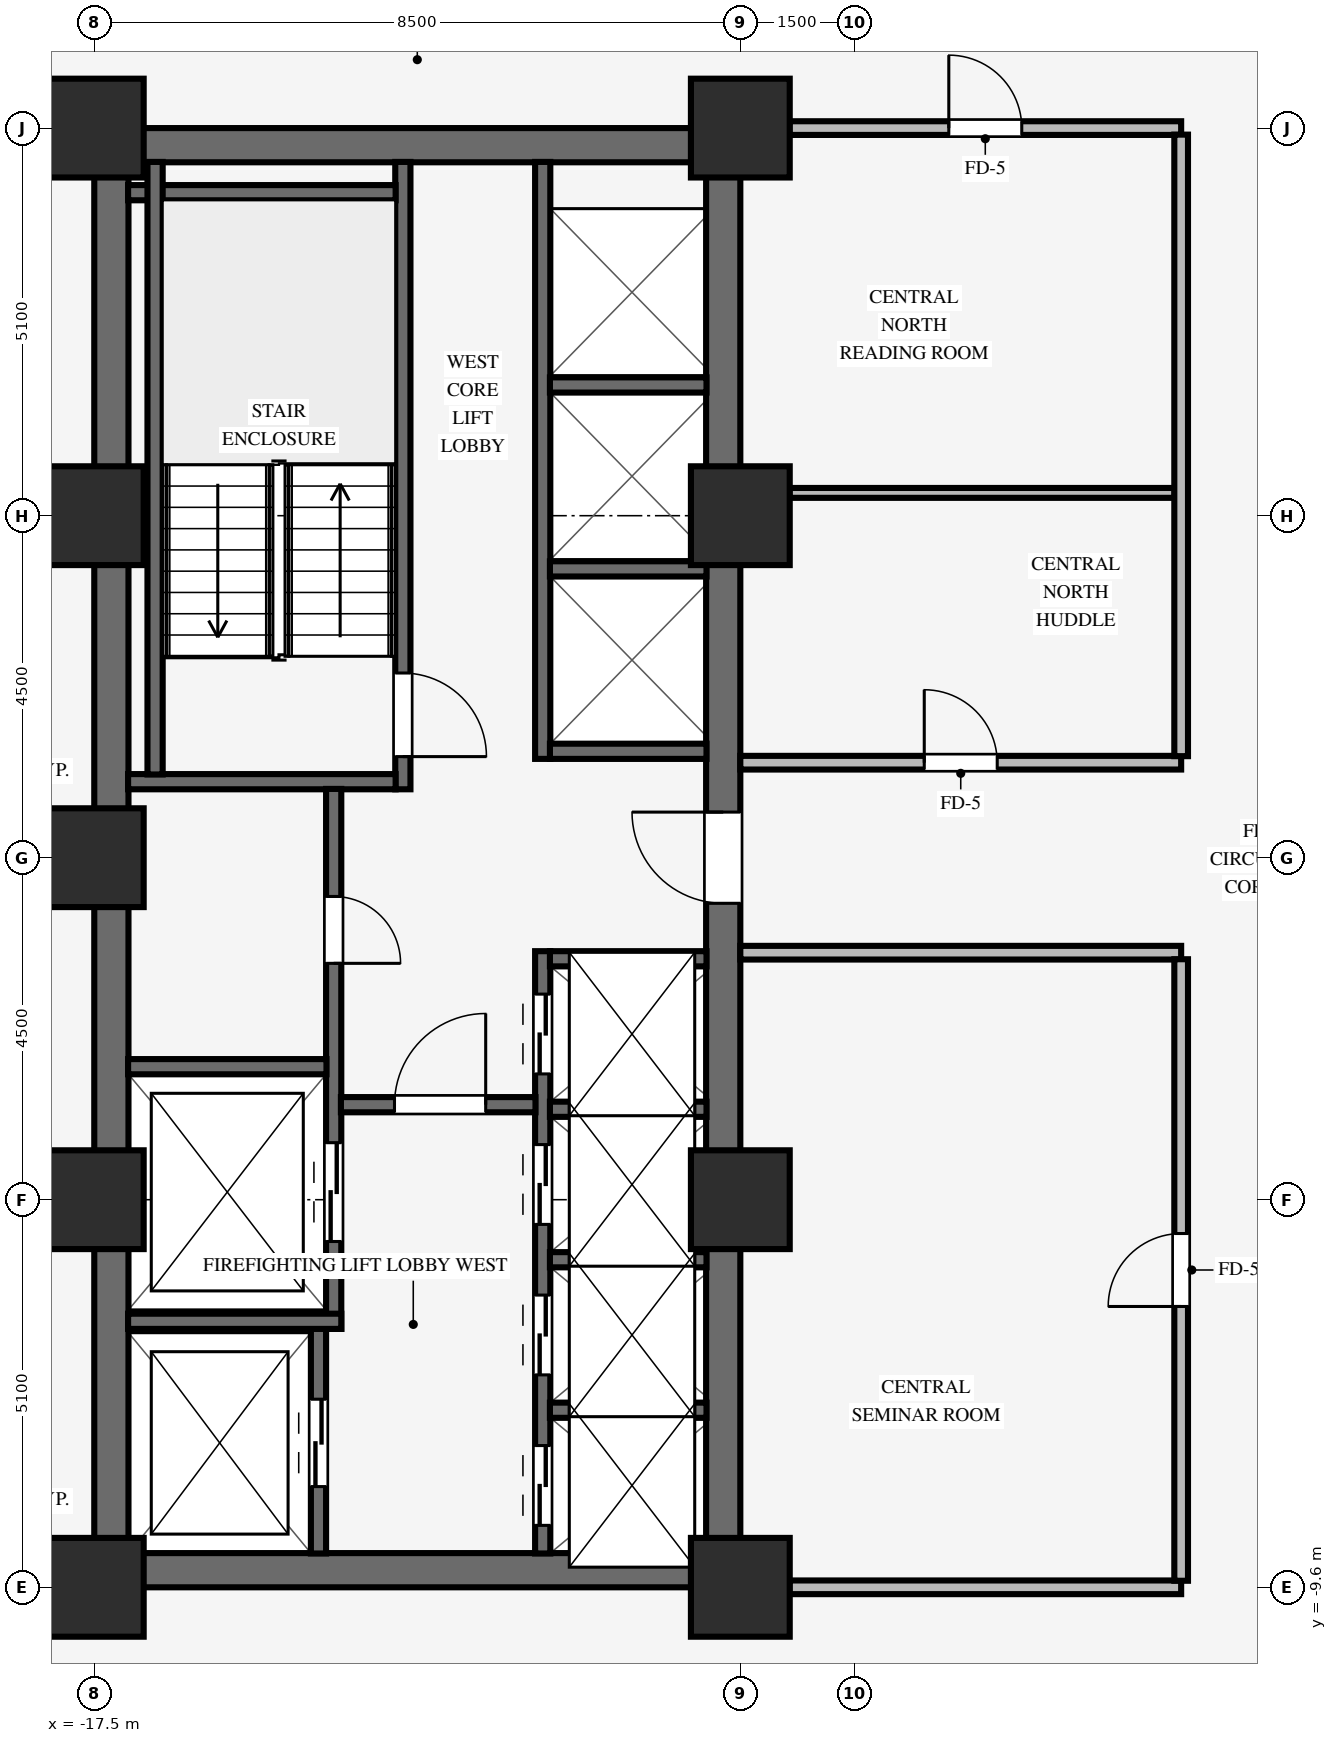
"""IFC4 building model, lengths in metres.
Left out: names, types, materials, properties, quantities, classifications, styles, units other than length and angle.
Written with IfcOpenShell. Run it as: python <this file> out.ifc"""

import sys

from ifc_helpers import new_model, si_unit, direction, frame, frame_2d, origin, origin_2d, place, context, subcontext, project, spatial, rectangle, extrude, source, transform, mapped, element, fill, save


model = new_model("IFC4")
c1 = context("Model", 3, precision=1e-05, world=origin(), true_north=direction((0.0, 1.0)))
c2 = subcontext(c1, "Body", "Model", "MODEL_VIEW")
j1 = project(units=[si_unit("LENGTHUNIT", "METRE"), si_unit("PLANEANGLEUNIT", "RADIAN")], contexts=[c1])
p1 = place(None, origin())
s1 = spatial("IfcSite", under=j1, at=p1, CompositionType="ELEMENT")
p2 = place(p1, origin())
s2 = spatial("IfcBuilding", under=s1, at=p2, CompositionType="ELEMENT")
p3 = place(p2, frame((0.0, 0.0, 42.2)))
s3 = spatial("IfcBuildingStorey", under=s2, at=p3, CompositionType="ELEMENT", Elevation=42.2)
for number, where, z_axis, x_axis in (
    (1, (-17.5, -9.375, 0.0), (0.0, 0.0, 1.0), (1.0, 0.0, 0.0)),
    (2, (-17.5, 9.375, 0.0), (0.0, 0.0, 1.0), (1.0, 0.0, 0.0)),
):
    element("IfcWall", number, at=place(p3, frame(where, z_axis=z_axis, x_axis=x_axis)), inside=s3, PredefinedType="SHEAR", context=c2, shape_type="SweptSolid", body=[
        extrude(rectangle(XDim=8.5, YDim=0.45, at=frame_2d((4.25, 0.0))), origin(), (0.0, 0.0, 1.0), 3.37),
    ])
p4 = place(p3, frame((-17.275, -9.155, 0.0), z_axis=(0.0, 0.0, 1.0), x_axis=(0.0, 1.0, 0.0)))
e3 = element("IfcWall", 3, at=p4, inside=s3, PredefinedType="SHEAR", context=c2, shape_type="SweptSolid", body=[
    extrude(rectangle(XDim=18.31, YDim=0.45, at=frame_2d((9.155, 0.0))), origin(), (0.0, 0.0, 1.0), 3.37),
])
p5 = place(p3, frame((-9.225, -9.155, 0.0), z_axis=(0.0, 0.0, 1.0), x_axis=(0.0, 1.0, 0.0)))
e4 = element("IfcWall", 4, at=p5, inside=s3, PredefinedType="SHEAR", context=c2, shape_type="SweptSolid", body=[
    extrude(rectangle(XDim=18.31, YDim=0.45, at=frame_2d((9.155, 0.0))), origin(), (0.0, 0.0, 1.0), 3.37),
])
p6 = place(p5, frame((8.555, 0.0, 0.0)))
e5 = element("IfcOpeningElement", 5, at=p6, cuts=e4, PredefinedType="OPENING", context=c2, shape_type="SweptSolid", body=[
    extrude(rectangle(XDim=1.2, YDim=2.15, at=frame_2d((0.6, 1.075))), frame((0.0, 0.235, 0.0), z_axis=(0.0, -1.0, 0.0), x_axis=(1.0, 0.0, 0.0)), (0.0, 0.0, 1.0), 0.47),
])
for number, where, z_axis, x_axis in (
    (6, (-17.5, -9.6, 0.0), (0.0, 0.0, 1.0), (1.0, 0.0, 0.0)),
    (7, (-17.5, -4.5, 0.0), (0.0, 0.0, 1.0), (1.0, 0.0, 0.0)),
    (8, (-17.5, 4.5, 0.0), (0.0, 0.0, 1.0), (1.0, 0.0, 0.0)),
    (9, (-17.5, 9.6, 0.0), (0.0, 0.0, 1.0), (1.0, 0.0, 0.0)),
    (10, (-9.0, -9.6, 0.0), (0.0, 0.0, 1.0), (1.0, 0.0, 0.0)),
    (11, (-9.0, -4.5, 0.0), (0.0, 0.0, 1.0), (1.0, 0.0, 0.0)),
    (12, (-9.0, 4.5, 0.0), (0.0, 0.0, 1.0), (1.0, 0.0, 0.0)),
    (13, (-9.0, 9.6, 0.0), (0.0, 0.0, 1.0), (1.0, 0.0, 0.0)),
    (14, (-17.5, 0.0, 0.0), (0.0, 0.0, 1.0), (1.0, 0.0, 0.0)),
):
    element("IfcColumn", number, at=place(p3, frame(where, z_axis=z_axis, x_axis=x_axis)), inside=s3, PredefinedType="COLUMN", context=c2, shape_type="SweptSolid", body=[
        extrude(rectangle(XDim=1.3, YDim=1.3, at=origin_2d()), origin(), (0.0, 0.0, 1.0), 3.37),
    ])
p7 = place(p3, frame((-13.44, 0.9, 0.0), z_axis=(0.0, 0.0, 1.0), x_axis=(0.0, 1.0, 0.0)))
e15 = element("IfcWall", 15, at=p7, inside=s3, PredefinedType="SHEAR", context=c2, shape_type="SweptSolid", body=[
    extrude(rectangle(XDim=8.255, YDim=0.2, at=frame_2d((4.127, 0.0))), origin(), (0.0, 0.0, 1.0), 3.37),
])
p8 = place(p7, frame((1.53, 0.0, 0.0), z_axis=(0.0, 0.0, 1.0), x_axis=(-1.0, 0.0, 0.0)))
e16 = element("IfcOpeningElement", 16, at=p8, cuts=e15, PredefinedType="OPENING", context=c2, shape_type="SweptSolid", body=[
    extrude(rectangle(XDim=1.1, YDim=2.15, at=frame_2d((0.55, 1.075))), frame((0.0, 0.11, 0.0), z_axis=(0.0, -1.0, 0.0), x_axis=(1.0, 0.0, 0.0)), (0.0, 0.0, 1.0), 0.22),
])
for number, where, z_axis, x_axis in (
    (17, (-17.055, 1.0, 0.0), (0.0, 0.0, 1.0), (1.0, 0.0, 0.0)),
    (18, (-17.055, 8.75, 0.0), (0.0, 0.0, 1.0), (1.0, 0.0, 0.0)),
):
    element("IfcWall", number, at=place(p3, frame(where, z_axis=z_axis, x_axis=x_axis)), inside=s3, PredefinedType="SHEAR", context=c2, shape_type="SweptSolid", body=[
        extrude(rectangle(XDim=3.52, YDim=0.2, at=frame_2d((1.76, 0.0))), origin(), (0.0, 0.0, 1.0), 3.37),
    ])
p9 = place(p3, frame((-16.7, 1.095, 0.0), z_axis=(0.0, 0.0, 1.0), x_axis=(0.0, 1.0, 0.0)))
e19 = element("IfcWall", 19, at=p9, inside=s3, PredefinedType="SHEAR", context=c2, shape_type="SweptSolid", body=[
    extrude(rectangle(XDim=8.06, YDim=0.2, at=frame_2d((4.03, 0.0))), origin(), (0.0, 0.0, 1.0), 3.37),
])
p10 = place(p3, frame((-14.55, -9.155, 0.0), z_axis=(0.0, 0.0, 1.0), x_axis=(0.0, 1.0, 0.0)))
e20 = element("IfcWall", 20, at=p10, inside=s3, PredefinedType="SHEAR", context=c2, shape_type="SweptSolid", body=[
    extrude(rectangle(XDim=2.96, YDim=0.2, at=frame_2d((1.48, 0.0))), origin(), (0.0, 0.0, 1.0), 3.37),
])
p11 = place(p10, frame((0.88, 0.0, 0.0)))
e21 = element("IfcOpeningElement", 21, at=p11, cuts=e20, PredefinedType="OPENING", context=c2, shape_type="SweptSolid", body=[
    extrude(rectangle(XDim=1.15, YDim=2.15, at=frame_2d((0.575, 1.075))), frame((0.0, 0.11, 0.0), z_axis=(0.0, -1.0, 0.0), x_axis=(1.0, 0.0, 0.0)), (0.0, 0.0, 1.0), 0.22),
])
p12 = place(p3, frame((-14.35, -6.2, 0.0), z_axis=(0.0, 0.0, 1.0), x_axis=(0.0, 1.0, 0.0)))
e22 = element("IfcWall", 22, at=p12, inside=s3, PredefinedType="SHEAR", context=c2, shape_type="SweptSolid", body=[
    extrude(rectangle(XDim=7.105, YDim=0.2, at=frame_2d((3.552, 0.0))), origin(), (0.0, 0.0, 1.0), 3.37),
])
p13 = place(p12, frame((5.69, 0.0, 0.0), z_axis=(0.0, 0.0, 1.0), x_axis=(-1.0, 0.0, 0.0)))
e23 = element("IfcOpeningElement", 23, at=p13, cuts=e22, PredefinedType="OPENING", context=c2, shape_type="SweptSolid", body=[
    extrude(rectangle(XDim=0.88, YDim=2.1, at=frame_2d((0.44, 1.05))), frame((0.0, 0.11, 0.0), z_axis=(0.0, -1.0, 0.0), x_axis=(1.0, 0.0, 0.0)), (0.0, 0.0, 1.0), 0.22),
])
p14 = place(p12, frame((1.15, 0.0, 0.0)))
e24 = element("IfcOpeningElement", 24, at=p14, cuts=e22, PredefinedType="OPENING", context=c2, shape_type="SweptSolid", body=[
    extrude(rectangle(XDim=1.3, YDim=2.2, at=frame_2d((0.65, 1.1))), frame((0.0, 0.11, 0.0), z_axis=(0.0, -1.0, 0.0), x_axis=(1.0, 0.0, 0.0)), (0.0, 0.0, 1.0), 0.22),
])
p15 = place(p3, frame((-17.055, -6.1, 0.0), z_axis=(0.0, 0.0, 1.0), x_axis=(1.0, 0.0, 0.0)))
e25 = element("IfcWall", 25, at=p15, inside=s3, PredefinedType="SHEAR", context=c2, shape_type="SweptSolid", body=[
    extrude(rectangle(XDim=2.805, YDim=0.2, at=frame_2d((1.402, 0.0))), origin(), (0.0, 0.0, 1.0), 3.37),
])
p16 = place(p3, frame((-17.055, -2.75, 0.0), z_axis=(0.0, 0.0, 1.0), x_axis=(1.0, 0.0, 0.0)))
e26 = element("IfcWall", 26, at=p16, inside=s3, PredefinedType="SHEAR", context=c2, shape_type="SweptSolid", body=[
    extrude(rectangle(XDim=2.61, YDim=0.2, at=frame_2d((1.305, 0.0))), origin(), (0.0, 0.0, 1.0), 3.37),
])
p17 = place(p3, frame((-11.6, -9.155, 0.0), z_axis=(0.0, 0.0, 1.0), x_axis=(0.0, 1.0, 0.0)))
e27 = element("IfcWall", 27, at=p17, inside=s3, PredefinedType="SHEAR", context=c2, shape_type="SweptSolid", body=[
    extrude(rectangle(XDim=7.925, YDim=0.2, at=frame_2d((3.962, 0.0))), origin(), (0.0, 0.0, 1.0), 3.37),
])
p18 = place(p17, frame((0.37, 0.0, 0.0)))
e28 = element("IfcOpeningElement", 28, at=p18, cuts=e27, PredefinedType="OPENING", context=c2, shape_type="SweptSolid", body=[
    extrude(rectangle(XDim=1.05, YDim=2.15, at=frame_2d((0.525, 1.075))), frame((0.0, 0.11, 0.0), z_axis=(0.0, -1.0, 0.0), x_axis=(1.0, 0.0, 0.0)), (0.0, 0.0, 1.0), 0.22),
])
p19 = place(p17, frame((2.35, 0.0, 0.0)))
e29 = element("IfcOpeningElement", 29, at=p19, cuts=e27, PredefinedType="OPENING", context=c2, shape_type="SweptSolid", body=[
    extrude(rectangle(XDim=1.05, YDim=2.15, at=frame_2d((0.525, 1.075))), frame((0.0, 0.11, 0.0), z_axis=(0.0, -1.0, 0.0), x_axis=(1.0, 0.0, 0.0)), (0.0, 0.0, 1.0), 0.22),
])
p20 = place(p17, frame((4.33, 0.0, 0.0)))
e30 = element("IfcOpeningElement", 30, at=p20, cuts=e27, PredefinedType="OPENING", context=c2, shape_type="SweptSolid", body=[
    extrude(rectangle(XDim=1.05, YDim=2.15, at=frame_2d((0.525, 1.075))), frame((0.0, 0.11, 0.0), z_axis=(0.0, -1.0, 0.0), x_axis=(1.0, 0.0, 0.0)), (0.0, 0.0, 1.0), 0.22),
])
p21 = place(p17, frame((6.31, 0.0, 0.0)))
e31 = element("IfcOpeningElement", 31, at=p21, cuts=e27, PredefinedType="OPENING", context=c2, shape_type="SweptSolid", body=[
    extrude(rectangle(XDim=1.05, YDim=2.15, at=frame_2d((0.525, 1.075))), frame((0.0, 0.11, 0.0), z_axis=(0.0, -1.0, 0.0), x_axis=(1.0, 0.0, 0.0)), (0.0, 0.0, 1.0), 0.22),
])
p22 = place(p3, frame((-14.255, -3.25, 0.0), z_axis=(0.0, 0.0, 1.0), x_axis=(1.0, 0.0, 0.0)))
e32 = element("IfcWall", 32, at=p22, inside=s3, PredefinedType="SHEAR", context=c2, shape_type="SweptSolid", body=[
    extrude(rectangle(XDim=2.56, YDim=0.2, at=frame_2d((1.28, 0.0))), origin(), (0.0, 0.0, 1.0), 3.37),
])
p23 = place(p22, frame((0.705, 0.0, 0.0)))
e33 = element("IfcOpeningElement", 33, at=p23, cuts=e32, PredefinedType="OPENING", context=c2, shape_type="SweptSolid", body=[
    extrude(rectangle(XDim=1.2, YDim=2.15, at=frame_2d((0.6, 1.075))), frame((0.0, 0.11, 0.0), z_axis=(0.0, -1.0, 0.0), x_axis=(1.0, 0.0, 0.0)), (0.0, 0.0, 1.0), 0.22),
])
for number, where, z_axis, x_axis in (
    (34, (-11.505, -7.27, 0.0), (0.0, 0.0, 1.0), (1.0, 0.0, 0.0)),
    (35, (-11.505, -5.29, 0.0), (0.0, 0.0, 1.0), (1.0, 0.0, 0.0)),
    (36, (-11.505, -3.31, 0.0), (0.0, 0.0, 1.0), (1.0, 0.0, 0.0)),
    (37, (-11.505, -1.33, 0.0), (0.0, 0.0, 1.0), (1.0, 0.0, 0.0)),
):
    element("IfcWall", number, at=place(p3, frame(where, z_axis=z_axis, x_axis=x_axis)), inside=s3, PredefinedType="SHEAR", context=c2, shape_type="SweptSolid", body=[
        extrude(rectangle(XDim=2.06, YDim=0.2, at=frame_2d((1.03, 0.0))), origin(), (0.0, 0.0, 1.0), 3.37),
    ])
p24 = place(p3, frame((-11.6, 1.3, 0.0), z_axis=(0.0, 0.0, 1.0), x_axis=(0.0, 1.0, 0.0)))
e38 = element("IfcWall", 38, at=p24, inside=s3, PredefinedType="SHEAR", context=c2, shape_type="SweptSolid", body=[
    extrude(rectangle(XDim=7.855, YDim=0.2, at=frame_2d((3.927, 0.0))), origin(), (0.0, 0.0, 1.0), 3.37),
])
for number, where, z_axis, x_axis in (
    (39, (-11.505, 1.4, 0.0), (0.0, 0.0, 1.0), (1.0, 0.0, 0.0)),
    (40, (-11.505, 3.8, 0.0), (0.0, 0.0, 1.0), (1.0, 0.0, 0.0)),
    (41, (-11.505, 6.22, 0.0), (0.0, 0.0, 1.0), (1.0, 0.0, 0.0)),
):
    element("IfcWall", number, at=place(p3, frame(where, z_axis=z_axis, x_axis=x_axis)), inside=s3, PredefinedType="SHEAR", context=c2, shape_type="SweptSolid", body=[
        extrude(rectangle(XDim=2.06, YDim=0.2, at=frame_2d((1.03, 0.0))), origin(), (0.0, 0.0, 1.0), 3.37),
    ])
p25 = place(p3, frame((-8.354, -9.6, 0.0), z_axis=(0.0, 0.0, 1.0), x_axis=(1.0, 0.0, 0.0)))
e42 = element("IfcWall", 42, at=p25, inside=s3, PredefinedType="PARTITIONING", context=c2, shape_type="SweptSolid", body=[
    extrude(rectangle(XDim=5.154, YDim=0.18, at=frame_2d((2.577, 0.0))), origin(), (0.0, 0.0, 1.0), 2.405),
])
p26 = place(p3, frame((-9.0, -1.25, 0.0), z_axis=(0.0, 0.0, 1.0), x_axis=(1.0, 0.0, 0.0)))
e43 = element("IfcWall", 43, at=p26, inside=s3, PredefinedType="PARTITIONING", context=c2, shape_type="SweptSolid", body=[
    extrude(rectangle(XDim=5.8, YDim=0.18, at=frame_2d((2.9, 0.0))), origin(), (0.0, 0.0, 1.0), 3.36),
])
p27 = place(p3, frame((-9.0, 1.25, 0.0), z_axis=(0.0, 0.0, 1.0), x_axis=(1.0, 0.0, 0.0)))
e44 = element("IfcWall", 44, at=p27, inside=s3, PredefinedType="PARTITIONING", context=c2, shape_type="SweptSolid", body=[
    extrude(rectangle(XDim=5.8, YDim=0.18, at=frame_2d((2.9, 0.0))), origin(), (0.0, 0.0, 1.0), 3.36),
])
p28 = place(p27, frame((2.42, 0.0, 0.0)))
e45 = element("IfcOpeningElement", 45, at=p28, cuts=e44, PredefinedType="OPENING", context=c2, shape_type="SweptSolid", body=[
    extrude(rectangle(XDim=0.96, YDim=2.1, at=frame_2d((0.48, 1.05))), frame((0.0, 0.1, 0.0), z_axis=(0.0, -1.0, 0.0), x_axis=(1.0, 0.0, 0.0)), (0.0, 0.0, 1.0), 0.2),
])
p29 = place(p3, frame((-8.354, 4.8, 0.0), z_axis=(0.0, 0.0, 1.0), x_axis=(1.0, 0.0, 0.0)))
e46 = element("IfcWall", 46, at=p29, inside=s3, PredefinedType="PARTITIONING", context=c2, shape_type="SweptSolid", body=[
    extrude(rectangle(XDim=5.068, YDim=0.13, at=frame_2d((2.534, 0.0))), origin(), (0.0, 0.0, 1.0), 2.738),
])
p30 = place(p3, frame((-8.354, 9.6, 0.0), z_axis=(0.0, 0.0, 1.0), x_axis=(1.0, 0.0, 0.0)))
e47 = element("IfcWall", 47, at=p30, inside=s3, PredefinedType="PARTITIONING", context=c2, shape_type="SweptSolid", body=[
    extrude(rectangle(XDim=5.154, YDim=0.18, at=frame_2d((2.577, 0.0))), origin(), (0.0, 0.0, 1.0), 2.405),
])
p31 = place(p30, frame((2.097, 0.0, 0.0)))
e48 = element("IfcOpeningElement", 48, at=p31, cuts=e47, PredefinedType="OPENING", context=c2, shape_type="SweptSolid", body=[
    extrude(rectangle(XDim=0.96, YDim=2.1, at=frame_2d((0.48, 1.05))), frame((0.0, 0.1, 0.0), z_axis=(0.0, -1.0, 0.0), x_axis=(1.0, 0.0, 0.0)), (0.0, 0.0, 1.0), 0.2),
])
p32 = place(p3, frame((-3.2, -9.514, 0.0), z_axis=(0.0, 0.0, 1.0), x_axis=(0.0, 1.0, 0.0)))
e49 = element("IfcWall", 49, at=p32, inside=s3, PredefinedType="PARTITIONING", context=c2, shape_type="SweptSolid", body=[
    extrude(rectangle(XDim=8.178, YDim=0.18, at=frame_2d((4.089, 0.0))), origin(), (0.0, 0.0, 1.0), 3.36),
])
p33 = place(p32, frame((3.609, 0.0, 0.0)))
e50 = element("IfcOpeningElement", 50, at=p33, cuts=e49, PredefinedType="OPENING", context=c2, shape_type="SweptSolid", body=[
    extrude(rectangle(XDim=0.96, YDim=2.1, at=frame_2d((0.48, 1.05))), frame((0.0, 0.1, 0.0), z_axis=(0.0, -1.0, 0.0), x_axis=(1.0, 0.0, 0.0)), (0.0, 0.0, 1.0), 0.2),
])
p34 = place(p3, frame((-3.2, 1.336, 0.0), z_axis=(0.0, 0.0, 1.0), x_axis=(0.0, 1.0, 0.0)))
e51 = element("IfcWall", 51, at=p34, inside=s3, PredefinedType="PARTITIONING", context=c2, shape_type="SweptSolid", body=[
    extrude(rectangle(XDim=8.178, YDim=0.18, at=frame_2d((4.089, 0.0))), origin(), (0.0, 0.0, 1.0), 3.36),
])
m1 = source(origin(), c2, "Body", "SweptSolid", [
    extrude(rectangle(XDim=1.1, YDim=2.15, at=frame_2d((0.55, 1.075))), frame((0.0, 0.025, 0.0), z_axis=(0.0, -1.0, 0.0), x_axis=(1.0, 0.0, 0.0)), (0.0, 0.0, 1.0), 0.05),
])
p35 = place(p8, origin())
e52 = element("IfcDoor", 52, at=p35, inside=s3, OperationType="SINGLE_SWING_RIGHT", PredefinedType="DOOR", context=c2, shape_type="MappedRepresentation", body=[
    mapped(m1, transform((0.0, 0.0, 0.0), scale=1.0)),
])
fill(e16, e52)
m2 = source(origin(), c2, "Body", "SweptSolid", [
    extrude(rectangle(XDim=0.88, YDim=2.1, at=frame_2d((0.44, 1.05))), frame((0.0, 0.025, 0.0), z_axis=(0.0, -1.0, 0.0), x_axis=(1.0, 0.0, 0.0)), (0.0, 0.0, 1.0), 0.05),
])
p36 = place(p13, origin())
e53 = element("IfcDoor", 53, at=p36, inside=s3, OperationType="SINGLE_SWING_RIGHT", PredefinedType="DOOR", context=c2, shape_type="MappedRepresentation", body=[
    mapped(m2, transform((0.0, 0.0, 0.0), scale=1.0)),
])
fill(e23, e53)
m3 = source(origin(), c2, "Body", "SweptSolid", [
    extrude(rectangle(XDim=1.2, YDim=2.15, at=frame_2d((0.6, 1.075))), frame((0.0, 0.025, 0.0), z_axis=(0.0, -1.0, 0.0), x_axis=(1.0, 0.0, 0.0)), (0.0, 0.0, 1.0), 0.05),
])
p37 = place(p23, origin())
e54 = element("IfcDoor", 54, at=p37, inside=s3, OperationType="SINGLE_SWING_RIGHT", PredefinedType="DOOR", context=c2, shape_type="MappedRepresentation", body=[
    mapped(m3, transform((0.0, 0.0, 0.0), scale=1.0)),
])
fill(e33, e54)
p38 = place(p6, origin())
e55 = element("IfcDoor", 55, at=p38, inside=s3, OperationType="SINGLE_SWING_RIGHT", PredefinedType="DOOR", context=c2, shape_type="MappedRepresentation", body=[
    mapped(m3, transform((0.0, 0.0, 0.0), scale=1.0)),
])
fill(e5, e55)
m4 = source(origin(), c2, "Body", "SweptSolid", [
    extrude(rectangle(XDim=1.15, YDim=2.15, at=frame_2d((0.575, 1.075))), frame((0.0, 0.025, 0.0), z_axis=(0.0, -1.0, 0.0), x_axis=(1.0, 0.0, 0.0)), (0.0, 0.0, 1.0), 0.05),
])
p39 = place(p11, origin())
e56 = element("IfcDoor", 56, at=p39, inside=s3, OperationType="DOUBLE_DOOR_SLIDING", PredefinedType="DOOR", context=c2, shape_type="MappedRepresentation", body=[
    mapped(m4, transform((0.0, 0.0, 0.0), scale=1.0)),
])
fill(e21, e56)
m5 = source(origin(), c2, "Body", "SweptSolid", [
    extrude(rectangle(XDim=1.3, YDim=2.2, at=frame_2d((0.65, 1.1))), frame((0.0, 0.025, 0.0), z_axis=(0.0, -1.0, 0.0), x_axis=(1.0, 0.0, 0.0)), (0.0, 0.0, 1.0), 0.05),
])
p40 = place(p14, origin())
e57 = element("IfcDoor", 57, at=p40, inside=s3, OperationType="DOUBLE_DOOR_SLIDING", PredefinedType="DOOR", context=c2, shape_type="MappedRepresentation", body=[
    mapped(m5, transform((0.0, 0.0, 0.0), scale=1.0)),
])
fill(e24, e57)
m6 = source(origin(), c2, "Body", "SweptSolid", [
    extrude(rectangle(XDim=1.05, YDim=2.15, at=frame_2d((0.525, 1.075))), frame((0.0, 0.025, 0.0), z_axis=(0.0, -1.0, 0.0), x_axis=(1.0, 0.0, 0.0)), (0.0, 0.0, 1.0), 0.05),
])
p41 = place(p18, origin())
e58 = element("IfcDoor", 58, at=p41, inside=s3, OperationType="DOUBLE_DOOR_SLIDING", PredefinedType="DOOR", context=c2, shape_type="MappedRepresentation", body=[
    mapped(m6, transform((0.0, 0.0, 0.0), scale=1.0)),
])
fill(e28, e58)
p42 = place(p19, origin())
e59 = element("IfcDoor", 59, at=p42, inside=s3, OperationType="DOUBLE_DOOR_SLIDING", PredefinedType="DOOR", context=c2, shape_type="MappedRepresentation", body=[
    mapped(m6, transform((0.0, 0.0, 0.0), scale=1.0)),
])
fill(e29, e59)
p43 = place(p20, origin())
e60 = element("IfcDoor", 60, at=p43, inside=s3, OperationType="DOUBLE_DOOR_SLIDING", PredefinedType="DOOR", context=c2, shape_type="MappedRepresentation", body=[
    mapped(m6, transform((0.0, 0.0, 0.0), scale=1.0)),
])
fill(e30, e60)
p44 = place(p21, origin())
e61 = element("IfcDoor", 61, at=p44, inside=s3, OperationType="DOUBLE_DOOR_SLIDING", PredefinedType="DOOR", context=c2, shape_type="MappedRepresentation", body=[
    mapped(m6, transform((0.0, 0.0, 0.0), scale=1.0)),
])
fill(e31, e61)
m7 = source(origin(), c2, "Body", "SweptSolid", [
    extrude(rectangle(XDim=0.96, YDim=2.1, at=frame_2d((0.48, 1.05))), frame((0.0, 0.025, 0.0), z_axis=(0.0, -1.0, 0.0), x_axis=(1.0, 0.0, 0.0)), (0.0, 0.0, 1.0), 0.05),
])
p45 = place(p33, origin())
e62 = element("IfcDoor", 62, at=p45, inside=s3, OperationType="SINGLE_SWING_LEFT", PredefinedType="DOOR", context=c2, shape_type="MappedRepresentation", body=[
    mapped(m7, transform((0.0, 0.0, 0.0), scale=1.0)),
])
fill(e50, e62)
p46 = place(p28, origin())
e63 = element("IfcDoor", 63, at=p46, inside=s3, OperationType="SINGLE_SWING_LEFT", PredefinedType="DOOR", context=c2, shape_type="MappedRepresentation", body=[
    mapped(m7, transform((0.0, 0.0, 0.0), scale=1.0)),
])
fill(e45, e63)
p47 = place(p31, origin())
e64 = element("IfcDoor", 64, at=p47, inside=s3, OperationType="SINGLE_SWING_LEFT", PredefinedType="DOOR", context=c2, shape_type="MappedRepresentation", body=[
    mapped(m7, transform((0.0, 0.0, 0.0), scale=1.0)),
])
fill(e48, e64)
save(model, sys.argv[1])
